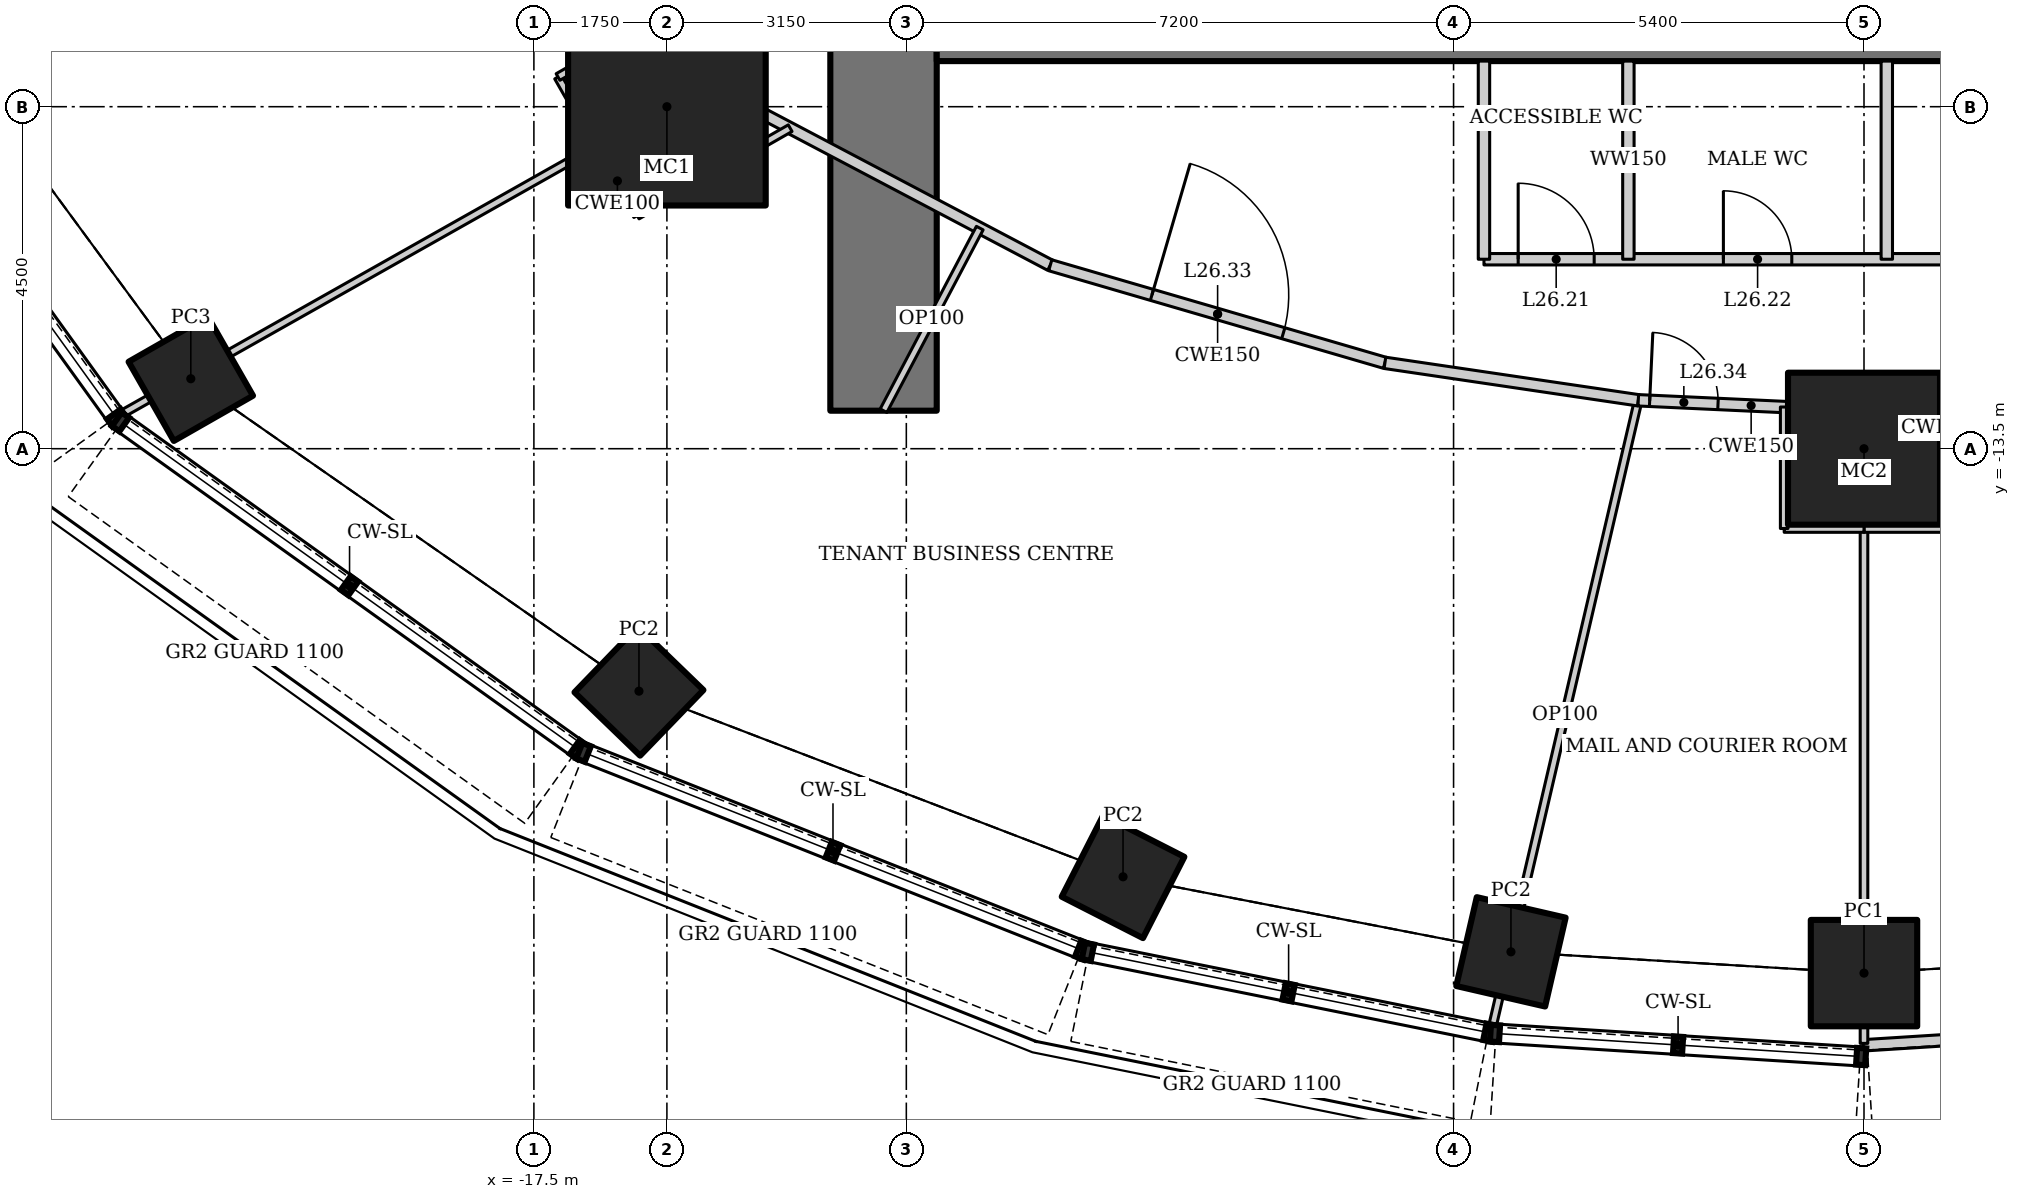
"""IFC4 building model, lengths in metres.
Left out: names, types, materials, properties, quantities, classifications, styles, units other than length and angle.
Written with IfcOpenShell. Run it as: python <this file> out.ifc"""

import sys

from ifc_helpers import new_model, si_unit, direction, frame, frame_2d, origin, origin_2d, place, context, subcontext, project, spatial, rectangle, hollow_rectangle, extrude, element, fill, save


model = new_model("IFC4")
c1 = context("Model", 3, precision=1e-05, world=origin(), true_north=direction((0.0, 1.0)))
c2 = subcontext(c1, "Body", "Model", "MODEL_VIEW")
j1 = project(units=[si_unit("LENGTHUNIT", "METRE"), si_unit("PLANEANGLEUNIT", "RADIAN")], contexts=[c1])
p1 = place(None, origin())
s1 = spatial("IfcSite", under=j1, at=p1, CompositionType="ELEMENT")
p2 = place(p1, origin())
s2 = spatial("IfcBuilding", under=s1, at=p2, CompositionType="ELEMENT")
p3 = place(p2, frame((0.0, 0.0, 111.4)))
s3 = spatial("IfcBuildingStorey", under=s2, at=p3, CompositionType="ELEMENT", Elevation=111.4)
p4 = place(p3, frame((-15.75, -9.0, 0.0), z_axis=(0.0, 0.0, 1.0), x_axis=(1.0, 0.0, 0.0)))
e1 = element("IfcColumn", 1, at=p4, inside=s3, PredefinedType="COLUMN", context=c2, shape_type="SweptSolid", body=[
    extrude(hollow_rectangle(XDim=2.6, YDim=2.6, WallThickness=0.13, at=origin_2d()), origin(), (0.0, 0.0, 1.0), 6.0),
])
p5 = place(p3, frame((0.0, -13.5, 0.0), z_axis=(0.0, 0.0, 1.0), x_axis=(1.0, 0.0, 0.0)))
e2 = element("IfcColumn", 2, at=p5, inside=s3, PredefinedType="COLUMN", context=c2, shape_type="SweptSolid", body=[
    extrude(hollow_rectangle(XDim=2.0, YDim=2.0, WallThickness=0.17, at=origin_2d()), origin(), (0.0, 0.0, 1.0), 6.0),
])
p6 = place(p3, frame((-22.014, -12.579, 1.142), z_axis=(0.0, 0.0, 1.0), x_axis=(0.86824298017, 0.496139221777, 0.0)))
e3 = element("IfcColumn", 3, at=p6, inside=s3, PredefinedType="COLUMN", context=c2, shape_type="SweptSolid", body=[
    extrude(hollow_rectangle(XDim=1.2, YDim=1.2, WallThickness=0.12, at=origin_2d()), origin(), (0.0, 0.0, 1.0), 4.858),
])
p7 = place(p3, frame((-16.118, -16.69, 1.155), z_axis=(0.0, 0.0, 1.0), x_axis=(0.694658370459, 0.719339800339, 0.0)))
e4 = element("IfcColumn", 4, at=p7, inside=s3, PredefinedType="COLUMN", context=c2, shape_type="SweptSolid", body=[
    extrude(hollow_rectangle(XDim=1.2, YDim=1.2, WallThickness=0.1, at=origin_2d()), origin(), (0.0, 0.0, 1.0), 4.845),
])
p8 = place(p3, frame((-9.749, -19.133, 1.165), z_axis=(0.0, 0.0, 1.0), x_axis=(0.45399049974, 0.891006524188, 0.0)))
e5 = element("IfcColumn", 5, at=p8, inside=s3, PredefinedType="COLUMN", context=c2, shape_type="SweptSolid", body=[
    extrude(hollow_rectangle(XDim=1.2, YDim=1.2, WallThickness=0.1, at=origin_2d()), origin(), (0.0, 0.0, 1.0), 4.835),
])
p9 = place(p3, frame((-4.645, -20.12, 1.17), z_axis=(0.0, 0.0, 1.0), x_axis=(0.224951054344, 0.974370064785, 0.0)))
e6 = element("IfcColumn", 6, at=p9, inside=s3, PredefinedType="COLUMN", context=c2, shape_type="SweptSolid", body=[
    extrude(hollow_rectangle(XDim=1.2, YDim=1.2, WallThickness=0.1, at=origin_2d()), origin(), (0.0, 0.0, 1.0), 4.83),
])
p10 = place(p3, frame((0.0, -20.4, 1.367), z_axis=(0.0, 0.0, 1.0), x_axis=(1.0, 0.0, 0.0)))
e7 = element("IfcColumn", 7, at=p10, inside=s3, PredefinedType="COLUMN", context=c2, shape_type="SweptSolid", body=[
    extrude(hollow_rectangle(XDim=1.4, YDim=1.4, WallThickness=0.1, at=origin_2d()), origin(), (0.0, 0.0, 1.0), 4.633),
])
p11 = place(p3, frame((-12.9, 13.0, 0.0), z_axis=(0.0, 0.0, 1.0), x_axis=(0.0, -1.0, 0.0)))
e8 = element("IfcWall", 8, at=p11, inside=s3, PredefinedType="SHEAR", context=c2, shape_type="SweptSolid", body=[
    extrude(rectangle(XDim=26.0, YDim=1.4, at=frame_2d((13.0, 0.0))), origin(), (0.0, 0.0, 1.0), 6.0),
])
p12 = place(p11, frame((13.75, 0.0, 0.0)))
e9 = element("IfcOpeningElement", 9, at=p12, cuts=e8, PredefinedType="OPENING", context=c2, shape_type="SweptSolid", body=[
    extrude(rectangle(XDim=1.8, YDim=2.1, at=frame_2d((0.9, 1.05))), frame((0.0, 0.71, 0.0), z_axis=(0.0, -1.0, 0.0), x_axis=(1.0, 0.0, 0.0)), (0.0, 0.0, 1.0), 1.42),
])
p13 = place(p3, frame((-12.2, -7.6, 0.0), z_axis=(0.0, 0.0, 1.0), x_axis=(1.0, 0.0, 0.0)))
e10 = element("IfcWall", 10, at=p13, inside=s3, PredefinedType="SHEAR", context=c2, shape_type="SweptSolid", body=[
    extrude(rectangle(XDim=24.4, YDim=1.6, at=frame_2d((12.2, 0.0))), origin(), (0.0, 0.0, 1.0), 6.0),
])
p14 = place(p3, frame((-0.01, -21.35, 0.0), z_axis=(0.0, 0.0, 1.0), x_axis=(0.998023012605, 0.062849552989, 0.0)))
e11 = element("IfcWall", 11, at=p14, inside=s3, PredefinedType="ELEMENTEDWALL", context=c2, shape_type="SweptSolid", body=[
    extrude(rectangle(XDim=4.902, YDim=0.15, at=frame_2d((2.451, 0.0))), origin(), (0.0, 0.0, 1.0), 5.85),
])
p15 = place(p14, frame((1.551, 0.0, 0.0)))
e12 = element("IfcOpeningElement", 12, at=p15, cuts=e11, PredefinedType="OPENING", context=c2, shape_type="SweptSolid", body=[
    extrude(rectangle(XDim=1.8, YDim=2.4, at=frame_2d((0.9, 1.2))), frame((0.0, 0.085, 0.0), z_axis=(0.0, -1.0, 0.0), x_axis=(1.0, 0.0, 0.0)), (0.0, 0.0, 1.0), 0.17),
])
p16 = place(p3, frame((-22.949, -13.059, 0.0), z_axis=(0.0, 0.0, 1.0), x_axis=(0.870889908693, 0.491478144923, 0.0)))
e13 = element("IfcWall", 13, at=p16, inside=s3, PredefinedType="PARTITIONING", context=c2, shape_type="SweptSolid", body=[
    extrude(rectangle(XDim=8.865, YDim=0.1, at=frame_2d((4.432, 0.0))), origin(), (0.0, 0.0, 1.0), 4.65),
])
p17 = place(p3, frame((-4.897, -21.135, 0.0), z_axis=(0.0, 0.0, 1.0), x_axis=(0.226907932986, 0.973916213002, 0.0)))
e14 = element("IfcWall", 14, at=p17, inside=s3, PredefinedType="PARTITIONING", context=c2, shape_type="SweptSolid", body=[
    extrude(rectangle(XDim=8.493, YDim=0.1, at=frame_2d((4.247, 0.0))), origin(), (0.0, 0.0, 1.0), 5.149),
])
p18 = place(p3, frame((0.0, -21.325, 0.0), z_axis=(0.0, 0.0, 1.0), x_axis=(0.0, 1.0, 0.0)))
e15 = element("IfcWall", 15, at=p18, inside=s3, PredefinedType="PARTITIONING", context=c2, shape_type="SweptSolid", body=[
    extrude(rectangle(XDim=8.325, YDim=0.1, at=frame_2d((4.162, 0.0))), origin(), (0.0, 0.0, 1.0), 4.65),
])
p19 = place(p3, frame((-19.078, -4.757, 0.0), z_axis=(0.0, 0.0, 1.0), x_axis=(0.698305033542, -0.715800307439, 0.0)))
e16 = element("IfcWall", 16, at=p19, inside=s3, PredefinedType="PARTITIONING", context=c2, shape_type="SweptSolid", body=[
    extrude(rectangle(XDim=5.512, YDim=0.15, at=frame_2d((2.756, 0.0))), origin(), (0.0, 0.0, 1.0), 5.85),
])
p20 = place(p19, frame((0.15, 0.0, 0.0)))
e17 = element("IfcOpeningElement", 17, at=p20, cuts=e16, PredefinedType="OPENING", context=c2, shape_type="SweptSolid", body=[
    extrude(rectangle(XDim=0.9, YDim=2.1, at=frame_2d((0.45, 1.05))), frame((0.0, 0.085, 0.0), z_axis=(0.0, -1.0, 0.0), x_axis=(1.0, 0.0, 0.0)), (0.0, 0.0, 1.0), 0.17),
])
p21 = place(p3, frame((-15.229, -8.702, 0.0), z_axis=(0.0, 0.0, 1.0), x_axis=(0.884643590306, -0.466267860924, 0.0)))
e18 = element("IfcWall", 18, at=p21, inside=s3, PredefinedType="PARTITIONING", context=c2, shape_type="SweptSolid", body=[
    extrude(rectangle(XDim=5.113, YDim=0.15, at=frame_2d((2.557, 0.0))), origin(), (0.0, 0.0, 1.0), 5.85),
])
p22 = place(p3, frame((-10.706, -11.086, 0.0), z_axis=(0.0, 0.0, 1.0), x_axis=(0.96001728753, -0.279940721659, 0.0)))
e19 = element("IfcWall", 19, at=p22, inside=s3, PredefinedType="PARTITIONING", context=c2, shape_type="SweptSolid", body=[
    extrude(rectangle(XDim=4.586, YDim=0.15, at=frame_2d((2.293, 0.0))), origin(), (0.0, 0.0, 1.0), 5.85),
])
p23 = place(p22, frame((1.393, 0.0, 0.0)))
e20 = element("IfcOpeningElement", 20, at=p23, cuts=e19, PredefinedType="OPENING", context=c2, shape_type="SweptSolid", body=[
    extrude(rectangle(XDim=1.8, YDim=2.1, at=frame_2d((0.9, 1.05))), frame((0.0, 0.085, 0.0), z_axis=(0.0, -1.0, 0.0), x_axis=(1.0, 0.0, 0.0)), (0.0, 0.0, 1.0), 0.17),
])
p24 = place(p3, frame((-6.303, -12.37, 0.0), z_axis=(0.0, 0.0, 1.0), x_axis=(0.989262902935, -0.146146874329, 0.0)))
e21 = element("IfcWall", 21, at=p24, inside=s3, PredefinedType="PARTITIONING", context=c2, shape_type="SweptSolid", body=[
    extrude(rectangle(XDim=3.369, YDim=0.15, at=frame_2d((1.685, 0.0))), origin(), (0.0, 0.0, 1.0), 5.85),
])
p25 = place(p3, frame((-2.97, -12.863, 0.0), z_axis=(0.0, 0.0, 1.0), x_axis=(0.998934397568, -0.046152674403, 0.0)))
e22 = element("IfcWall", 22, at=p25, inside=s3, PredefinedType="PARTITIONING", context=c2, shape_type="SweptSolid", body=[
    extrude(rectangle(XDim=2.973, YDim=0.15, at=frame_2d((1.486, 0.0))), origin(), (0.0, 0.0, 1.0), 5.85),
])
p26 = place(p25, frame((0.15, 0.0, 0.0)))
e23 = element("IfcOpeningElement", 23, at=p26, cuts=e22, PredefinedType="OPENING", context=c2, shape_type="SweptSolid", body=[
    extrude(rectangle(XDim=0.9, YDim=2.1, at=frame_2d((0.45, 1.05))), frame((0.0, 0.085, 0.0), z_axis=(0.0, -1.0, 0.0), x_axis=(1.0, 0.0, 0.0)), (0.0, 0.0, 1.0), 0.17),
])
p27 = place(p3, frame((0.0, -13.0, 0.0), z_axis=(0.0, 0.0, 1.0), x_axis=(0.998934397568, 0.046152674403, 0.0)))
e24 = element("IfcWall", 24, at=p27, inside=s3, PredefinedType="PARTITIONING", context=c2, shape_type="SweptSolid", body=[
    extrude(rectangle(XDim=2.973, YDim=0.15, at=frame_2d((1.486, 0.0))), origin(), (0.0, 0.0, 1.0), 5.85),
])
p28 = place(p3, frame((-5.0, -11.007, 0.0), z_axis=(0.0, 0.0, 1.0), x_axis=(1.0, 0.0, 0.0)))
e25 = element("IfcWall", 25, at=p28, inside=s3, PredefinedType="SOLIDWALL", context=c2, shape_type="SweptSolid", body=[
    extrude(rectangle(XDim=10.0, YDim=0.15, at=frame_2d((5.0, 0.0))), origin(), (0.0, 0.0, 1.0), 5.85),
])
p29 = place(p28, frame((0.45, 0.0, 0.0)))
e26 = element("IfcOpeningElement", 26, at=p29, cuts=e25, PredefinedType="OPENING", context=c2, shape_type="SweptSolid", body=[
    extrude(rectangle(XDim=1.0, YDim=2.1, at=frame_2d((0.5, 1.05))), frame((0.0, 0.085, 0.0), z_axis=(0.0, -1.0, 0.0), x_axis=(1.0, 0.0, 0.0)), (0.0, 0.0, 1.0), 0.17),
])
p30 = place(p28, frame((3.15, 0.0, 0.0)))
e27 = element("IfcOpeningElement", 27, at=p30, cuts=e25, PredefinedType="OPENING", context=c2, shape_type="SweptSolid", body=[
    extrude(rectangle(XDim=0.9, YDim=2.1, at=frame_2d((0.45, 1.05))), frame((0.0, 0.085, 0.0), z_axis=(0.0, -1.0, 0.0), x_axis=(1.0, 0.0, 0.0)), (0.0, 0.0, 1.0), 0.17),
])
p31 = place(p28, frame((6.55, 0.0, 0.0)))
e28 = element("IfcOpeningElement", 28, at=p31, cuts=e25, PredefinedType="OPENING", context=c2, shape_type="SweptSolid", body=[
    extrude(rectangle(XDim=0.9, YDim=2.1, at=frame_2d((0.45, 1.05))), frame((0.0, 0.085, 0.0), z_axis=(0.0, -1.0, 0.0), x_axis=(1.0, 0.0, 0.0)), (0.0, 0.0, 1.0), 0.17),
])
p32 = place(p28, frame((8.95, 0.0, 0.0)))
e29 = element("IfcOpeningElement", 29, at=p32, cuts=e25, PredefinedType="OPENING", context=c2, shape_type="SweptSolid", body=[
    extrude(rectangle(XDim=0.8, YDim=2.1, at=frame_2d((0.4, 1.05))), frame((0.0, 0.085, 0.0), z_axis=(0.0, -1.0, 0.0), x_axis=(1.0, 0.0, 0.0)), (0.0, 0.0, 1.0), 0.17),
])
for number, where, z_axis, x_axis in (
    (30, (-5.0, -8.4, 0.0), (0.0, 0.0, 1.0), (0.0, -1.0, 0.0)),
    (31, (-3.1, -8.4, 0.0), (0.0, 0.0, 1.0), (0.0, -1.0, 0.0)),
):
    element("IfcWall", number, at=place(p3, frame(where, z_axis=z_axis, x_axis=x_axis)), inside=s3, PredefinedType="SOLIDWALL", context=c2, shape_type="SweptSolid", body=[
        extrude(rectangle(XDim=2.607, YDim=0.15, at=frame_2d((1.304, 0.0))), origin(), (0.0, 0.0, 1.0), 5.85),
    ])
p33 = place(p3, frame((0.3, -8.4, 0.0), z_axis=(0.0, 0.0, 1.0), x_axis=(0.0, -1.0, 0.0)))
e32 = element("IfcWall", 32, at=p33, inside=s3, PredefinedType="SOLIDWALL", context=c2, shape_type="SweptSolid", body=[
    extrude(rectangle(XDim=2.607, YDim=0.15, at=frame_2d((1.304, 0.0))), origin(), (0.0, 0.0, 1.0), 4.65),
])
for number, where, z_axis, x_axis in (
    (33, (1.05, -14.55, 0.0), (0.0, 0.0, 1.0), (-1.0, 0.0, 0.0)),
    (34, (0.0, -14.55, 0.0), (0.0, 0.0, 1.0), (-1.0, 0.0, 0.0)),
):
    element("IfcWall", number, at=place(p3, frame(where, z_axis=z_axis, x_axis=x_axis)), inside=s3, PredefinedType="PARTITIONING", context=c2, shape_type="SweptSolid", body=[
        extrude(rectangle(XDim=1.05, YDim=0.1, at=frame_2d((0.525, 0.0))), origin(), (0.0, 0.0, 1.0), 5.85),
    ])
p34 = place(p3, frame((-1.05, -14.55, 0.0), z_axis=(0.0, 0.0, 1.0), x_axis=(0.0, 1.0, 0.0)))
e35 = element("IfcWall", 35, at=p34, inside=s3, PredefinedType="PARTITIONING", context=c2, shape_type="SweptSolid", body=[
    extrude(rectangle(XDim=1.599, YDim=0.1, at=frame_2d((0.799, 0.0))), origin(), (0.0, 0.0, 1.0), 5.85),
])
p35 = place(p3, frame((-16.141, -10.433, 0.0), z_axis=(0.0, 0.0, 1.0), x_axis=(-0.496189017888, 0.868214523334, 0.0)))
e36 = element("IfcWall", 36, at=p35, inside=s3, PredefinedType="PARTITIONING", context=c2, shape_type="SweptSolid", body=[
    extrude(rectangle(XDim=1.05, YDim=0.1, at=frame_2d((0.525, 0.0))), origin(), (0.0, 0.0, 1.0), 5.85),
])
p36 = place(p3, frame((-16.666, -9.513, 0.0), z_axis=(0.0, 0.0, 1.0), x_axis=(-0.49623995811, 0.868185408755, 0.0)))
e37 = element("IfcWall", 37, at=p36, inside=s3, PredefinedType="PARTITIONING", context=c2, shape_type="SweptSolid", body=[
    extrude(rectangle(XDim=1.041, YDim=0.1, at=frame_2d((0.521, 0.0))), origin(), (0.0, 0.0, 1.0), 5.85),
])
p37 = place(p3, frame((-17.183, -8.609, 0.0), z_axis=(0.0, 0.0, 1.0), x_axis=(0.868214523334, 0.496189017888, 0.0)))
e38 = element("IfcWall", 38, at=p37, inside=s3, PredefinedType="PARTITIONING", context=c2, shape_type="SweptSolid", body=[
    extrude(rectangle(XDim=1.05, YDim=0.1, at=frame_2d((0.525, 0.0))), origin(), (0.0, 0.0, 1.0), 5.85),
])
p38 = place(p3, frame((-14.128, -9.283, 0.0), z_axis=(0.0, 0.0, 1.0), x_axis=(-0.868290539594, -0.496055983587, 0.0)))
e39 = element("IfcWall", 39, at=p38, inside=s3, PredefinedType="PARTITIONING", context=c2, shape_type="SweptSolid", body=[
    extrude(rectangle(XDim=1.268, YDim=0.1, at=frame_2d((0.634, 0.0))), origin(), (0.0, 0.0, 1.0), 5.85),
])
p39 = place(p3, frame((-15.229, -9.912, 0.0), z_axis=(0.0, 0.0, 1.0), x_axis=(-0.868214523334, -0.496189017888, 0.0)))
e40 = element("IfcWall", 40, at=p39, inside=s3, PredefinedType="PARTITIONING", context=c2, shape_type="SweptSolid", body=[
    extrude(rectangle(XDim=1.05, YDim=0.1, at=frame_2d((0.525, 0.0))), origin(), (0.0, 0.0, 1.0), 5.85),
])
p40 = place(p3, frame((-12.9, -13.0, 0.0), z_axis=(0.0, 0.0, 1.0), x_axis=(0.466205800243, 0.884676297761, 0.0)))
e41 = element("IfcWall", 41, at=p40, inside=s3, PredefinedType="PARTITIONING", context=c2, shape_type="SweptSolid", body=[
    extrude(rectangle(XDim=2.716, YDim=0.1, at=frame_2d((1.358, 0.0))), origin(), (0.0, 0.0, 1.0), 5.85),
])
p41 = place(p29, origin())
e42 = element("IfcDoor", 42, at=p41, inside=s3, OperationType="SINGLE_SWING_LEFT", PredefinedType="DOOR", context=c2, shape_type="SweptSolid", body=[
    extrude(rectangle(XDim=1.0, YDim=2.1, at=frame_2d((0.5, 1.05))), frame((0.0, 0.025, 0.0), z_axis=(0.0, -1.0, 0.0), x_axis=(1.0, 0.0, 0.0)), (0.0, 0.0, 1.0), 0.05),
])
fill(e26, e42)
p42 = place(p30, origin())
e43 = element("IfcDoor", 43, at=p42, inside=s3, OperationType="SINGLE_SWING_LEFT", PredefinedType="DOOR", context=c2, shape_type="SweptSolid", body=[
    extrude(rectangle(XDim=0.9, YDim=2.1, at=frame_2d((0.45, 1.05))), frame((0.0, 0.025, 0.0), z_axis=(0.0, -1.0, 0.0), x_axis=(1.0, 0.0, 0.0)), (0.0, 0.0, 1.0), 0.05),
])
fill(e27, e43)
p43 = place(p23, origin())
e44 = element("IfcDoor", 44, at=p43, inside=s3, OperationType="DOUBLE_DOOR_DOUBLE_SWING", PredefinedType="DOOR", context=c2, shape_type="SweptSolid", body=[
    extrude(rectangle(XDim=1.8, YDim=2.1, at=frame_2d((0.9, 1.05))), frame((0.0, 0.025, 0.0), z_axis=(0.0, -1.0, 0.0), x_axis=(1.0, 0.0, 0.0)), (0.0, 0.0, 1.0), 0.05),
])
fill(e20, e44)
p44 = place(p26, origin())
e45 = element("IfcDoor", 45, at=p44, inside=s3, OperationType="SINGLE_SWING_LEFT", PredefinedType="DOOR", context=c2, shape_type="SweptSolid", body=[
    extrude(rectangle(XDim=0.9, YDim=2.1, at=frame_2d((0.45, 1.05))), frame((0.0, 0.025, 0.0), z_axis=(0.0, -1.0, 0.0), x_axis=(1.0, 0.0, 0.0)), (0.0, 0.0, 1.0), 0.05),
])
fill(e23, e45)
save(model, sys.argv[1])
